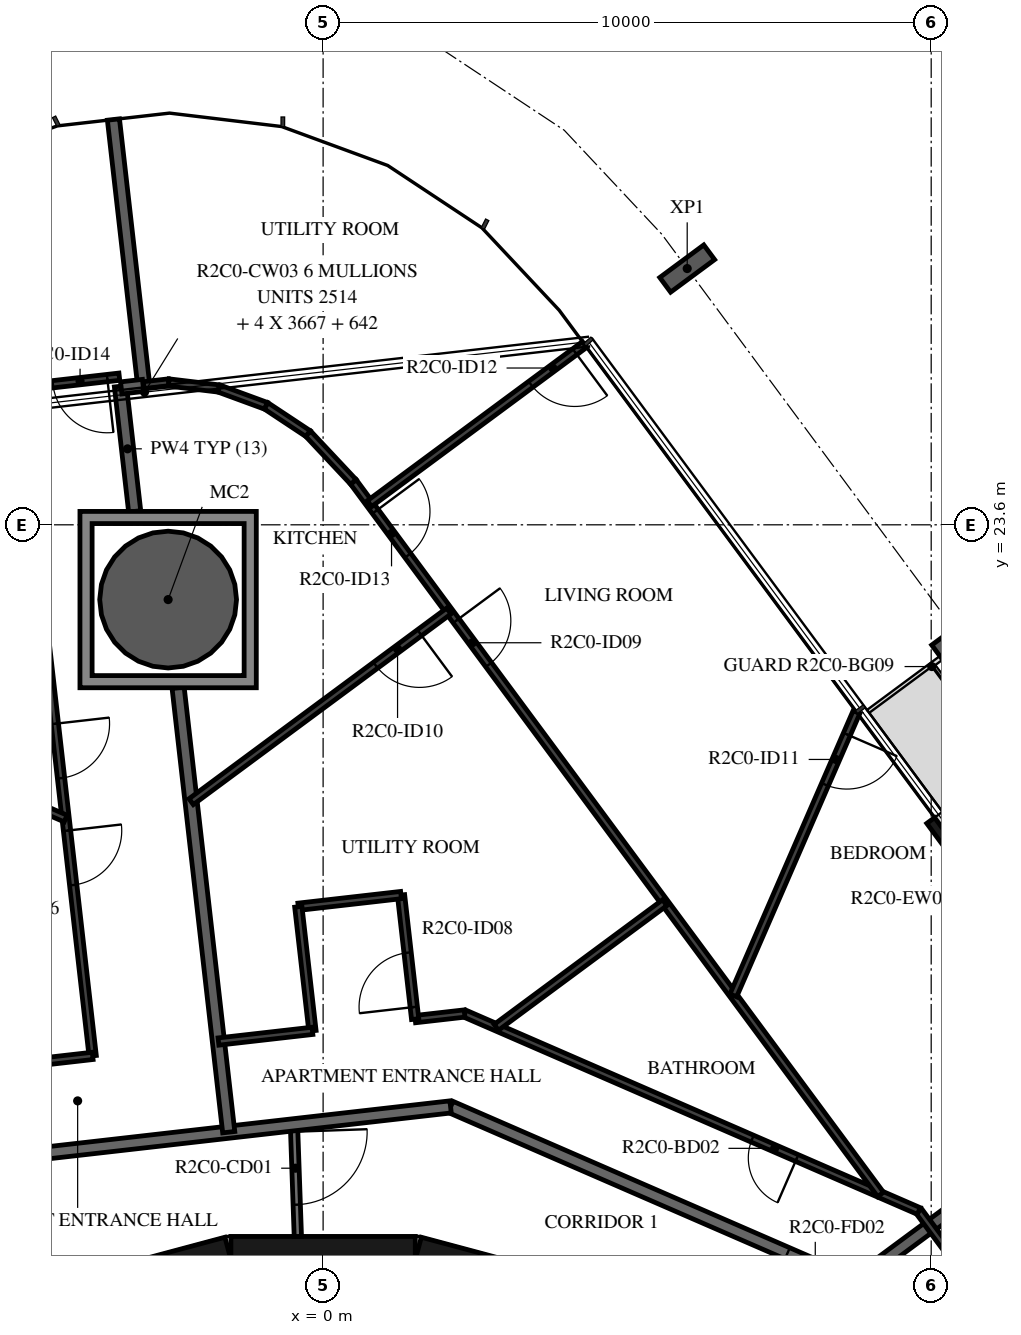
"""IFC4 building model, lengths in metres.
Left out: names, types, materials, properties, quantities, classifications, styles, units other than length and angle.
Written with IfcOpenShell. Run it as: python <this file> out.ifc"""

import sys

from ifc_helpers import new_model, si_unit, direction, frame, frame_2d, origin, origin_2d, place, context, subcontext, project, spatial, polyline, rectangle, hollow_circle, i_section, outline, extrude, element, fill, save


model = new_model("IFC4")
c1 = context("Model", 3, precision=1e-05, world=origin(), true_north=direction((0.0, 1.0)))
c2 = subcontext(c1, "Body", "Model", "MODEL_VIEW")
j1 = project(units=[si_unit("LENGTHUNIT", "METRE"), si_unit("PLANEANGLEUNIT", "RADIAN")], contexts=[c1])
p1 = place(None, origin())
s1 = spatial("IfcSite", under=j1, at=p1, CompositionType="ELEMENT")
p2 = place(p1, origin())
s2 = spatial("IfcBuilding", under=s1, at=p2, CompositionType="ELEMENT")
p3 = place(p2, frame((0.0, 0.0, 104.7)))
s3 = spatial("IfcBuildingStorey", under=s2, at=p3, CompositionType="ELEMENT", Elevation=104.7)
p4 = place(p3, frame((-2.549, 22.37, -0.38), z_axis=(0.0, 0.0, 1.0), x_axis=(1.0, 0.0, 0.0)))
e1 = element("IfcColumn", 1, at=p4, inside=s3, PredefinedType="COLUMN", context=c2, shape_type="SweptSolid", body=[
    extrude(hollow_circle(Radius=1.125, WallThickness=0.055, at=origin_2d()), origin(), (0.0, 0.0, 1.0), 2.576),
])
for number, where, z_axis, x_axis in (
    (2, (10.46, 21.77, -0.38), (0.0, 0.0, 1.0), (0.595, -0.804, 0.0)),
    (3, (5.988, 27.814, -0.38), (0.0, 0.0, 1.0), (0.595, -0.804, 0.0)),
):
    element("IfcColumn", number, at=place(p3, frame(where, z_axis=z_axis, x_axis=x_axis)), inside=s3, PredefinedType="COLUMN", context=c2, shape_type="SweptSolid", body=[
        extrude(i_section(OverallWidth=0.3, OverallDepth=0.9, WebThickness=0.019, FlangeThickness=0.035, FilletRadius=0.03, at=origin_2d()), origin(), (0.0, 0.0, 1.0), 2.616),
    ])
p5 = place(p3, frame((11.895, 16.165, 0.0), z_axis=(0.0, 0.0, 1.0), x_axis=(-0.594774973163, 0.803892238611, 0.0)))
e4 = element("IfcWall", 4, at=p5, inside=s3, PredefinedType="STANDARD", context=c2, shape_type="SweptSolid", body=[
    extrude(rectangle(XDim=3.2, YDim=0.16, at=frame_2d((1.6, 0.0))), origin(), (0.0, 0.0, 1.0), 3.05),
])
p6 = place(p5, frame((0.4, 0.0, 0.0)))
e5 = element("IfcOpeningElement", 5, at=p6, cuts=e4, PredefinedType="OPENING", context=c2, shape_type="SweptSolid", body=[
    extrude(rectangle(XDim=2.4, YDim=2.4, at=frame_2d((1.2, 1.2))), frame((0.0, 0.09, 0.0), z_axis=(0.0, -1.0, 0.0), x_axis=(1.0, 0.0, 0.0)), (0.0, 0.0, 1.0), 0.18),
])
for number, where, z_axis, x_axis in (
    (6, (4.479, 10.858, 0.0), (0.0, 0.0, 1.0), (-0.966, 0.259, 0.0)),
    (7, (1.516, 11.647, 0.0), (0.0, 0.0, 1.0), (-1.0, 0.0, 0.0)),
    (8, (-1.55, 11.643, 0.0), (0.0, 0.0, 1.0), (-0.966, -0.259, 0.0)),
):
    element("IfcWall", number, at=place(p3, frame(where, z_axis=z_axis, x_axis=x_axis)), inside=s3, PredefinedType="SHEAR", context=c2, shape_type="SweptSolid", body=[
        extrude(rectangle(XDim=3.033, YDim=0.5, at=frame_2d((1.516, 0.0))), origin(), (0.0, 0.0, 1.0), 3.05),
    ])
p7 = place(p3, frame((-0.479, 13.734, 0.0), z_axis=(0.0, 0.0, 1.0), x_axis=(0.034805430832, -0.999394107439, 0.0)))
e9 = element("IfcWall", 9, at=p7, inside=s3, PredefinedType="PARTITIONING", context=c2, shape_type="SweptSolid", body=[
    extrude(rectangle(XDim=1.838, YDim=0.12, at=frame_2d((0.919, 0.0))), origin(), (0.0, 0.0, 1.0), 3.05),
])
p8 = place(p7, frame((0.115, 0.0, 0.0)))
e10 = element("IfcOpeningElement", 10, at=p8, cuts=e9, PredefinedType="OPENING", context=c2, shape_type="SweptSolid", body=[
    extrude(rectangle(XDim=1.2, YDim=2.1, at=frame_2d((0.6, 1.05))), frame((0.0, 0.07, 0.0), z_axis=(0.0, -1.0, 0.0), x_axis=(1.0, 0.0, 0.0)), (0.0, 0.0, 1.0), 0.14),
])
p9 = place(p3, frame((8.736, 11.141, 0.0), z_axis=(0.0, 0.0, 1.0), x_axis=(-0.917051290697, 0.398769269416, 0.0)))
e11 = element("IfcWall", 11, at=p9, inside=s3, PredefinedType="STANDARD", context=c2, shape_type="SweptSolid", body=[
    extrude(rectangle(XDim=7.24, YDim=0.2, at=frame_2d((3.62, 0.0))), origin(), (0.0, 0.0, 1.0), 3.05),
])
p10 = place(p9, frame((0.2, 0.0, 0.0)))
e12 = element("IfcOpeningElement", 12, at=p10, cuts=e11, PredefinedType="OPENING", context=c2, shape_type="SweptSolid", body=[
    extrude(rectangle(XDim=1.0, YDim=2.1, at=frame_2d((0.5, 1.05))), frame((0.0, 0.11, 0.0), z_axis=(0.0, -1.0, 0.0), x_axis=(1.0, 0.0, 0.0)), (0.0, 0.0, 1.0), 0.22),
])
p11 = place(p3, frame((2.096, 14.028, 0.0), z_axis=(0.0, 0.0, 1.0), x_axis=(-0.993569170114, -0.113226782163, 0.0)))
e13 = element("IfcWall", 13, at=p11, inside=s3, PredefinedType="STANDARD", context=c2, shape_type="SweptSolid", body=[
    extrude(rectangle(XDim=7.342, YDim=0.2, at=frame_2d((3.671, 0.0))), origin(), (0.0, 0.0, 1.0), 3.05),
])
p12 = place(p3, frame((13.244, 14.477, 0.0), z_axis=(0.0, 0.0, 1.0), x_axis=(-0.803853971109, -0.594826691677, 0.0)))
e14 = element("IfcWall", 14, at=p12, inside=s3, PredefinedType="STANDARD", context=c2, shape_type="SweptSolid", body=[
    extrude(rectangle(XDim=5.609, YDim=0.2, at=frame_2d((2.804, 0.0))), origin(), (0.0, 0.0, 1.0), 3.05),
])
p13 = place(p3, frame((-2.385, 20.92, 0.0), z_axis=(0.0, 0.0, 1.0), x_axis=(0.113177776247, -0.993574753586, 0.0)))
e15 = element("IfcWall", 15, at=p13, inside=s3, PredefinedType="STANDARD", context=c2, shape_type="SweptSolid", body=[
    extrude(rectangle(XDim=7.356, YDim=0.2, at=frame_2d((3.678, 0.0))), origin(), (0.0, 0.0, 1.0), 3.05),
])
p14 = place(p3, frame((-3.448, 30.265, 0.0), z_axis=(0.0, 0.0, 1.0), x_axis=(0.113189797494, -0.993573384176, 0.0)))
e16 = element("IfcWall", 16, at=p14, inside=s3, PredefinedType="STANDARD", context=c2, shape_type="SweptSolid", body=[
    extrude(rectangle(XDim=4.4, YDim=0.2, at=frame_2d((2.2, 0.0))), origin(), (0.0, 0.0, 1.0), 3.05),
])
p15 = place(p3, frame((-3.333, 25.879, 0.0), z_axis=(0.0, 0.0, 1.0), x_axis=(0.113250782095, -0.993566434797, 0.0)))
e17 = element("IfcWall", 17, at=p15, inside=s3, PredefinedType="STANDARD", context=c2, shape_type="SweptSolid", body=[
    extrude(rectangle(XDim=2.072, YDim=0.2, at=frame_2d((1.036, 0.0))), origin(), (0.0, 0.0, 1.0), 3.05),
])
p16 = place(p3, frame((-2.96, 25.892, 0.0), z_axis=(0.0, 0.0, 1.0), x_axis=(-0.993567388358, -0.113242416041, 0.0)))
e18 = element("IfcWall", 18, at=p16, inside=s3, PredefinedType="STANDARD", context=c2, shape_type="SweptSolid", body=[
    extrude(rectangle(XDim=0.362, YDim=0.2, at=frame_2d((0.181, 0.0))), origin(), (0.0, 0.0, 1.0), 3.05),
])
p17 = place(p3, frame((10.91, 10.81, 0.0), z_axis=(0.0, 0.0, 1.0), x_axis=(-0.59489693125, 0.803801991282, 0.0)))
e19 = element("IfcWall", 19, at=p17, inside=s3, PredefinedType="PARTITIONING", context=c2, shape_type="SweptSolid", body=[
    extrude(rectangle(XDim=1.872, YDim=0.12, at=frame_2d((0.936, 0.0))), origin(), (0.0, 0.0, 1.0), 3.05),
])
p18 = place(p3, frame((9.796, 12.315, 0.0), z_axis=(0.0, 0.0, 1.0), x_axis=(-0.917059572812, 0.398750222463, 0.0)))
e20 = element("IfcWall", 20, at=p18, inside=s3, PredefinedType="PARTITIONING", context=c2, shape_type="SweptSolid", body=[
    extrude(rectangle(XDim=8.146, YDim=0.12, at=frame_2d((4.073, 0.0))), origin(), (0.0, 0.0, 1.0), 3.05),
])
p19 = place(p18, frame((2.185, 0.0, 0.0)))
e21 = element("IfcOpeningElement", 21, at=p19, cuts=e20, PredefinedType="OPENING", context=c2, shape_type="SweptSolid", body=[
    extrude(rectangle(XDim=0.8, YDim=2.1, at=frame_2d((0.4, 1.05))), frame((0.0, 0.07, 0.0), z_axis=(0.0, -1.0, 0.0), x_axis=(1.0, 0.0, 0.0)), (0.0, 0.0, 1.0), 0.14),
])
p20 = place(p3, frame((2.326, 15.563, 0.0), z_axis=(0.0, 0.0, 1.0), x_axis=(-0.993570169982, -0.113218007944, 0.0)))
e22 = element("IfcWall", 22, at=p20, inside=s3, PredefinedType="PARTITIONING", context=c2, shape_type="SweptSolid", body=[
    extrude(rectangle(XDim=0.817, YDim=0.12, at=frame_2d((0.409, 0.0))), origin(), (0.0, 0.0, 1.0), 3.05),
])
p21 = place(p3, frame((1.514, 15.471, 0.0), z_axis=(0.0, 0.0, 1.0), x_axis=(-0.113301814952, 0.993560616535, 0.0)))
e23 = element("IfcWall", 23, at=p21, inside=s3, PredefinedType="PARTITIONING", context=c2, shape_type="SweptSolid", body=[
    extrude(rectangle(XDim=2.053, YDim=0.12, at=frame_2d((1.027, 0.0))), origin(), (0.0, 0.0, 1.0), 3.05),
])
p22 = place(p21, frame((0.2, 0.0, 0.0)))
e24 = element("IfcOpeningElement", 24, at=p22, cuts=e23, PredefinedType="OPENING", context=c2, shape_type="SweptSolid", body=[
    extrude(rectangle(XDim=0.9, YDim=2.1, at=frame_2d((0.45, 1.05))), frame((0.0, 0.07, 0.0), z_axis=(0.0, -1.0, 0.0), x_axis=(1.0, 0.0, 0.0)), (0.0, 0.0, 1.0), 0.14),
])
p23 = place(p3, frame((1.281, 17.511, 0.0), z_axis=(0.0, 0.0, 1.0), x_axis=(-0.993575191649, -0.113173930474, 0.0)))
e25 = element("IfcWall", 25, at=p23, inside=s3, PredefinedType="PARTITIONING", context=c2, shape_type="SweptSolid", body=[
    extrude(rectangle(XDim=1.7, YDim=0.12, at=frame_2d((0.85, 0.0))), origin(), (0.0, 0.0, 1.0), 3.05),
])
p24 = place(p3, frame((-0.408, 17.319, 0.0), z_axis=(0.0, 0.0, 1.0), x_axis=(0.113184449176, -0.993573993452, 0.0)))
e26 = element("IfcWall", 26, at=p24, inside=s3, PredefinedType="PARTITIONING", context=c2, shape_type="SweptSolid", body=[
    extrude(rectangle(XDim=2.053, YDim=0.12, at=frame_2d((1.027, 0.0))), origin(), (0.0, 0.0, 1.0), 3.05),
])
p25 = place(p3, frame((-0.175, 15.278, 0.0), z_axis=(0.0, 0.0, 1.0), x_axis=(-0.993575604955, -0.113170301923, 0.0)))
e27 = element("IfcWall", 27, at=p25, inside=s3, PredefinedType="PARTITIONING", context=c2, shape_type="SweptSolid", body=[
    extrude(rectangle(XDim=1.555, YDim=0.12, at=frame_2d((0.778, 0.0))), origin(), (0.0, 0.0, 1.0), 3.05),
])
p26 = place(p3, frame((0.498, 24.306, 0.0), z_axis=(0.0, 0.0, 1.0), x_axis=(0.594826122019, -0.803854392639, 0.0)))
e28 = element("IfcWall", 28, at=p26, inside=s3, PredefinedType="PARTITIONING", context=c2, shape_type="SweptSolid", body=[
    extrude(rectangle(XDim=14.576, YDim=0.12, at=frame_2d((7.288, 0.0))), origin(), (0.0, 0.0, 1.0), 3.05),
])
p27 = place(p26, frame((2.841, 0.0, 0.0)))
e29 = element("IfcOpeningElement", 29, at=p27, cuts=e28, PredefinedType="OPENING", context=c2, shape_type="SweptSolid", body=[
    extrude(rectangle(XDim=0.9, YDim=2.1, at=frame_2d((0.45, 1.05))), frame((0.0, 0.07, 0.0), z_axis=(0.0, -1.0, 0.0), x_axis=(1.0, 0.0, 0.0)), (0.0, 0.0, 1.0), 0.14),
])
p28 = place(p26, frame((0.605, 0.0, 0.0)))
e30 = element("IfcOpeningElement", 30, at=p28, cuts=e28, PredefinedType="OPENING", context=c2, shape_type="SweptSolid", body=[
    extrude(rectangle(XDim=0.9, YDim=2.1, at=frame_2d((0.45, 1.05))), frame((0.0, 0.07, 0.0), z_axis=(0.0, -1.0, 0.0), x_axis=(1.0, 0.0, 0.0)), (0.0, 0.0, 1.0), 0.14),
])
p29 = place(p3, frame((8.772, 20.521, 0.0), z_axis=(0.0, 0.0, 1.0), x_axis=(-0.398733139635, -0.917067000473, 0.0)))
e31 = element("IfcWall", 31, at=p29, inside=s3, PredefinedType="PARTITIONING", context=c2, shape_type="SweptSolid", body=[
    extrude(rectangle(XDim=5.081, YDim=0.12, at=frame_2d((2.541, 0.0))), origin(), (0.0, 0.0, 1.0), 3.05),
])
p30 = place(p29, frame((0.4, 0.0, 0.0)))
e32 = element("IfcOpeningElement", 32, at=p30, cuts=e31, PredefinedType="OPENING", context=c2, shape_type="SweptSolid", body=[
    extrude(rectangle(XDim=0.9, YDim=2.1, at=frame_2d((0.45, 1.05))), frame((0.0, 0.07, 0.0), z_axis=(0.0, -1.0, 0.0), x_axis=(1.0, 0.0, 0.0)), (0.0, 0.0, 1.0), 0.14),
])
p31 = place(p3, frame((5.618, 17.386, 0.0), z_axis=(0.0, 0.0, 1.0), x_axis=(-0.803852063114, -0.59482927015, 0.0)))
e33 = element("IfcWall", 33, at=p31, inside=s3, PredefinedType="PARTITIONING", context=c2, shape_type="SweptSolid", body=[
    extrude(rectangle(XDim=3.446, YDim=0.12, at=frame_2d((1.723, 0.0))), origin(), (0.0, 0.0, 1.0), 3.05),
])
p32 = place(p3, frame((4.299, 26.565, 0.0), z_axis=(0.0, 0.0, 1.0), x_axis=(-0.803851981262, -0.594829380764, 0.0)))
e34 = element("IfcWall", 34, at=p32, inside=s3, PredefinedType="PARTITIONING", context=c2, shape_type="SweptSolid", body=[
    extrude(rectangle(XDim=4.4, YDim=0.12, at=frame_2d((2.2, 0.0))), origin(), (0.0, 0.0, 1.0), 3.05),
])
p33 = place(p32, frame((0.2, 0.0, 0.0)))
e35 = element("IfcOpeningElement", 35, at=p33, cuts=e34, PredefinedType="OPENING", context=c2, shape_type="SweptSolid", body=[
    extrude(rectangle(XDim=0.9, YDim=2.1, at=frame_2d((0.45, 1.05))), frame((0.0, 0.07, 0.0), z_axis=(0.0, -1.0, 0.0), x_axis=(1.0, 0.0, 0.0)), (0.0, 0.0, 1.0), 0.14),
])
p34 = place(p3, frame((2.068, 22.183, 0.0), z_axis=(0.0, 0.0, 1.0), x_axis=(-0.803867138365, -0.594808896921, 0.0)))
e36 = element("IfcWall", 36, at=p34, inside=s3, PredefinedType="PARTITIONING", context=c2, shape_type="SweptSolid", body=[
    extrude(rectangle(XDim=5.273, YDim=0.12, at=frame_2d((2.636, 0.0))), origin(), (0.0, 0.0, 1.0), 3.05),
])
p35 = place(p34, frame((0.6, 0.0, 0.0)))
e37 = element("IfcOpeningElement", 37, at=p35, cuts=e36, PredefinedType="OPENING", context=c2, shape_type="SweptSolid", body=[
    extrude(rectangle(XDim=0.9, YDim=2.1, at=frame_2d((0.45, 1.05))), frame((0.0, 0.07, 0.0), z_axis=(0.0, -1.0, 0.0), x_axis=(1.0, 0.0, 0.0)), (0.0, 0.0, 1.0), 0.14),
])
p36 = place(p3, frame((-2.95, 25.893, 0.0), z_axis=(0.0, 0.0, 1.0), x_axis=(0.993519378224, 0.113662857141, 0.0)))
e38 = element("IfcWall", 38, at=p36, inside=s3, PredefinedType="PARTITIONING", context=c2, shape_type="SweptSolid", body=[
    extrude(rectangle(XDim=0.415, YDim=0.12, at=frame_2d((0.207, 0.0))), origin(), (0.0, 0.0, 1.0), 3.05),
])
for number, where, z_axis, x_axis in (
    (39, (-2.538, 25.94, 0.0), (0.0, 0.0, 1.0), (0.993, -0.119, 0.0)),
    (40, (-1.715, 25.842, 0.0), (0.0, 0.0, 1.0), (0.939, -0.345, 0.0)),
    (41, (-0.937, 25.556, 0.0), (0.0, 0.0, 1.0), (0.834, -0.552, 0.0)),
):
    element("IfcWall", number, at=place(p3, frame(where, z_axis=z_axis, x_axis=x_axis)), inside=s3, PredefinedType="PARTITIONING", context=c2, shape_type="SweptSolid", body=[
        extrude(rectangle(XDim=0.829, YDim=0.12, at=frame_2d((0.415, 0.0))), origin(), (0.0, 0.0, 1.0), 3.05),
    ])
p37 = place(p3, frame((-0.246, 25.098, 0.0), z_axis=(0.0, 0.0, 1.0), x_axis=(0.684172712488, -0.729320025426, 0.0)))
e42 = element("IfcWall", 42, at=p37, inside=s3, PredefinedType="PARTITIONING", context=c2, shape_type="SweptSolid", body=[
    extrude(rectangle(XDim=1.087, YDim=0.12, at=frame_2d((0.543, 0.0))), origin(), (0.0, 0.0, 1.0), 3.05),
])
p38 = place(p3, frame((-3.351, 26.036, 0.0), z_axis=(0.0, 0.0, 1.0), x_axis=(-0.993575191649, -0.113173930474, 0.0)))
e43 = element("IfcWall", 43, at=p38, inside=s3, PredefinedType="PARTITIONING", context=c2, shape_type="SweptSolid", body=[
    extrude(rectangle(XDim=1.7, YDim=0.12, at=frame_2d((0.85, 0.0))), origin(), (0.0, 0.0, 1.0), 3.05),
])
p39 = place(p38, frame((0.2, 0.0, 0.0)))
e44 = element("IfcOpeningElement", 44, at=p39, cuts=e43, PredefinedType="OPENING", context=c2, shape_type="SweptSolid", body=[
    extrude(rectangle(XDim=0.9, YDim=2.1, at=frame_2d((0.45, 1.05))), frame((0.0, 0.07, 0.0), z_axis=(0.0, -1.0, 0.0), x_axis=(1.0, 0.0, 0.0)), (0.0, 0.0, 1.0), 0.14),
])
p40 = place(p3, frame((-5.04, 25.844, 0.0), z_axis=(0.0, 0.0, 1.0), x_axis=(0.1132106553, -0.993571007793, 0.0)))
e45 = element("IfcWall", 45, at=p40, inside=s3, PredefinedType="PARTITIONING", context=c2, shape_type="SweptSolid", body=[
    extrude(rectangle(XDim=11.048, YDim=0.12, at=frame_2d((5.524, 0.0))), origin(), (0.0, 0.0, 1.0), 3.05),
])
p41 = place(p40, frame((5.551, 0.0, 0.0)))
e46 = element("IfcOpeningElement", 46, at=p41, cuts=e45, PredefinedType="OPENING", context=c2, shape_type="SweptSolid", body=[
    extrude(rectangle(XDim=0.9, YDim=2.1, at=frame_2d((0.45, 1.05))), frame((0.0, 0.07, 0.0), z_axis=(0.0, -1.0, 0.0), x_axis=(1.0, 0.0, 0.0)), (0.0, 0.0, 1.0), 0.14),
])
p42 = place(p40, frame((7.32, 0.0, 0.0)))
e47 = element("IfcOpeningElement", 47, at=p42, cuts=e45, PredefinedType="OPENING", context=c2, shape_type="SweptSolid", body=[
    extrude(rectangle(XDim=0.9, YDim=2.1, at=frame_2d((0.45, 1.05))), frame((0.0, 0.07, 0.0), z_axis=(0.0, -1.0, 0.0), x_axis=(1.0, 0.0, 0.0)), (0.0, 0.0, 1.0), 0.14),
])
p43 = place(p3, frame((-3.79, 14.867, 0.0), z_axis=(0.0, 0.0, 1.0), x_axis=(-0.993557948123, -0.113325212204, 0.0)))
e48 = element("IfcWall", 48, at=p43, inside=s3, PredefinedType="PARTITIONING", context=c2, shape_type="SweptSolid", body=[
    extrude(rectangle(XDim=1.991, YDim=0.12, at=frame_2d((0.995, 0.0))), origin(), (0.0, 0.0, 1.0), 3.05),
])
p44 = place(p3, frame((-7.435, 20.161, 0.0), z_axis=(0.0, 0.0, 1.0), x_axis=(0.917055599503, -0.398759360291, 0.0)))
e49 = element("IfcWall", 49, at=p44, inside=s3, PredefinedType="PARTITIONING", context=c2, shape_type="SweptSolid", body=[
    extrude(rectangle(XDim=3.49, YDim=0.12, at=frame_2d((1.745, 0.0))), origin(), (0.0, 0.0, 1.0), 3.05),
])
p45 = place(p3, origin())
e50 = element("IfcWall", 50, at=p45, inside=s3, PredefinedType="STANDARD", context=c2, shape_type="SweptSolid", body=[
    extrude(outline(polyline([(-1.099, 23.82), (-1.099, 20.92), (-3.999, 20.92), (-3.999, 23.82), (-1.099, 23.82)]), holes=[polyline([(-3.799, 21.12), (-1.299, 21.12), (-1.299, 23.62), (-3.799, 23.62), (-3.799, 21.12)])]), origin(), (0.0, 0.0, 1.0), 3.05),
])
p46 = place(p10, origin())
e51 = element("IfcDoor", 51, at=p46, inside=s3, OperationType="SINGLE_SWING_RIGHT", PredefinedType="DOOR", context=c2, shape_type="SweptSolid", body=[
    extrude(rectangle(XDim=1.0, YDim=2.1, at=frame_2d((0.5, 1.05))), frame((0.0, 0.025, 0.0), z_axis=(0.0, -1.0, 0.0), x_axis=(1.0, 0.0, 0.0)), (0.0, 0.0, 1.0), 0.05),
])
fill(e12, e51)
p47 = place(p19, origin())
e52 = element("IfcDoor", 52, at=p47, inside=s3, OperationType="SINGLE_SWING_RIGHT", PredefinedType="DOOR", context=c2, shape_type="SweptSolid", body=[
    extrude(rectangle(XDim=0.8, YDim=2.1, at=frame_2d((0.4, 1.05))), frame((0.0, 0.025, 0.0), z_axis=(0.0, -1.0, 0.0), x_axis=(1.0, 0.0, 0.0)), (0.0, 0.0, 1.0), 0.05),
])
fill(e21, e52)
p48 = place(p22, origin())
e53 = element("IfcDoor", 53, at=p48, inside=s3, OperationType="SINGLE_SWING_RIGHT", PredefinedType="DOOR", context=c2, shape_type="SweptSolid", body=[
    extrude(rectangle(XDim=0.9, YDim=2.1, at=frame_2d((0.45, 1.05))), frame((0.0, 0.025, 0.0), z_axis=(0.0, -1.0, 0.0), x_axis=(1.0, 0.0, 0.0)), (0.0, 0.0, 1.0), 0.05),
])
fill(e24, e53)
p49 = place(p27, origin())
e54 = element("IfcDoor", 54, at=p49, inside=s3, OperationType="SINGLE_SWING_RIGHT", PredefinedType="DOOR", context=c2, shape_type="SweptSolid", body=[
    extrude(rectangle(XDim=0.9, YDim=2.1, at=frame_2d((0.45, 1.05))), frame((0.0, 0.025, 0.0), z_axis=(0.0, -1.0, 0.0), x_axis=(1.0, 0.0, 0.0)), (0.0, 0.0, 1.0), 0.05),
])
fill(e29, e54)
p50 = place(p35, origin())
e55 = element("IfcDoor", 55, at=p50, inside=s3, OperationType="SINGLE_SWING_RIGHT", PredefinedType="DOOR", context=c2, shape_type="SweptSolid", body=[
    extrude(rectangle(XDim=0.9, YDim=2.1, at=frame_2d((0.45, 1.05))), frame((0.0, 0.025, 0.0), z_axis=(0.0, -1.0, 0.0), x_axis=(1.0, 0.0, 0.0)), (0.0, 0.0, 1.0), 0.05),
])
fill(e37, e55)
p51 = place(p30, origin())
e56 = element("IfcDoor", 56, at=p51, inside=s3, OperationType="SINGLE_SWING_LEFT", PredefinedType="DOOR", context=c2, shape_type="SweptSolid", body=[
    extrude(rectangle(XDim=0.9, YDim=2.1, at=frame_2d((0.45, 1.05))), frame((0.0, 0.025, 0.0), z_axis=(0.0, -1.0, 0.0), x_axis=(1.0, 0.0, 0.0)), (0.0, 0.0, 1.0), 0.05),
])
fill(e32, e56)
p52 = place(p33, origin())
e57 = element("IfcDoor", 57, at=p52, inside=s3, OperationType="SINGLE_SWING_RIGHT", PredefinedType="DOOR", context=c2, shape_type="SweptSolid", body=[
    extrude(rectangle(XDim=0.9, YDim=2.1, at=frame_2d((0.45, 1.05))), frame((0.0, 0.025, 0.0), z_axis=(0.0, -1.0, 0.0), x_axis=(1.0, 0.0, 0.0)), (0.0, 0.0, 1.0), 0.05),
])
fill(e35, e57)
p53 = place(p28, origin())
e58 = element("IfcDoor", 58, at=p53, inside=s3, OperationType="SINGLE_SWING_LEFT", PredefinedType="DOOR", context=c2, shape_type="SweptSolid", body=[
    extrude(rectangle(XDim=0.9, YDim=2.1, at=frame_2d((0.45, 1.05))), frame((0.0, 0.025, 0.0), z_axis=(0.0, -1.0, 0.0), x_axis=(1.0, 0.0, 0.0)), (0.0, 0.0, 1.0), 0.05),
])
fill(e30, e58)
p54 = place(p39, origin())
e59 = element("IfcDoor", 59, at=p54, inside=s3, OperationType="SINGLE_SWING_RIGHT", PredefinedType="DOOR", context=c2, shape_type="SweptSolid", body=[
    extrude(rectangle(XDim=0.9, YDim=2.1, at=frame_2d((0.45, 1.05))), frame((0.0, 0.025, 0.0), z_axis=(0.0, -1.0, 0.0), x_axis=(1.0, 0.0, 0.0)), (0.0, 0.0, 1.0), 0.05),
])
fill(e44, e59)
p55 = place(p41, origin())
e60 = element("IfcDoor", 60, at=p55, inside=s3, OperationType="SINGLE_SWING_LEFT", PredefinedType="DOOR", context=c2, shape_type="SweptSolid", body=[
    extrude(rectangle(XDim=0.9, YDim=2.1, at=frame_2d((0.45, 1.05))), frame((0.0, 0.025, 0.0), z_axis=(0.0, -1.0, 0.0), x_axis=(1.0, 0.0, 0.0)), (0.0, 0.0, 1.0), 0.05),
])
fill(e46, e60)
p56 = place(p42, origin())
e61 = element("IfcDoor", 61, at=p56, inside=s3, OperationType="SINGLE_SWING_LEFT", PredefinedType="DOOR", context=c2, shape_type="SweptSolid", body=[
    extrude(rectangle(XDim=0.9, YDim=2.1, at=frame_2d((0.45, 1.05))), frame((0.0, 0.025, 0.0), z_axis=(0.0, -1.0, 0.0), x_axis=(1.0, 0.0, 0.0)), (0.0, 0.0, 1.0), 0.05),
])
fill(e47, e61)
p57 = place(p8, origin())
e62 = element("IfcDoor", 62, at=p57, inside=s3, OperationType="DOUBLE_DOOR_SINGLE_SWING", PredefinedType="DOOR", context=c2, shape_type="SweptSolid", body=[
    extrude(rectangle(XDim=1.2, YDim=2.1, at=frame_2d((0.6, 1.05))), frame((0.0, 0.025, 0.0), z_axis=(0.0, -1.0, 0.0), x_axis=(1.0, 0.0, 0.0)), (0.0, 0.0, 1.0), 0.05),
])
fill(e10, e62)
save(model, sys.argv[1])
